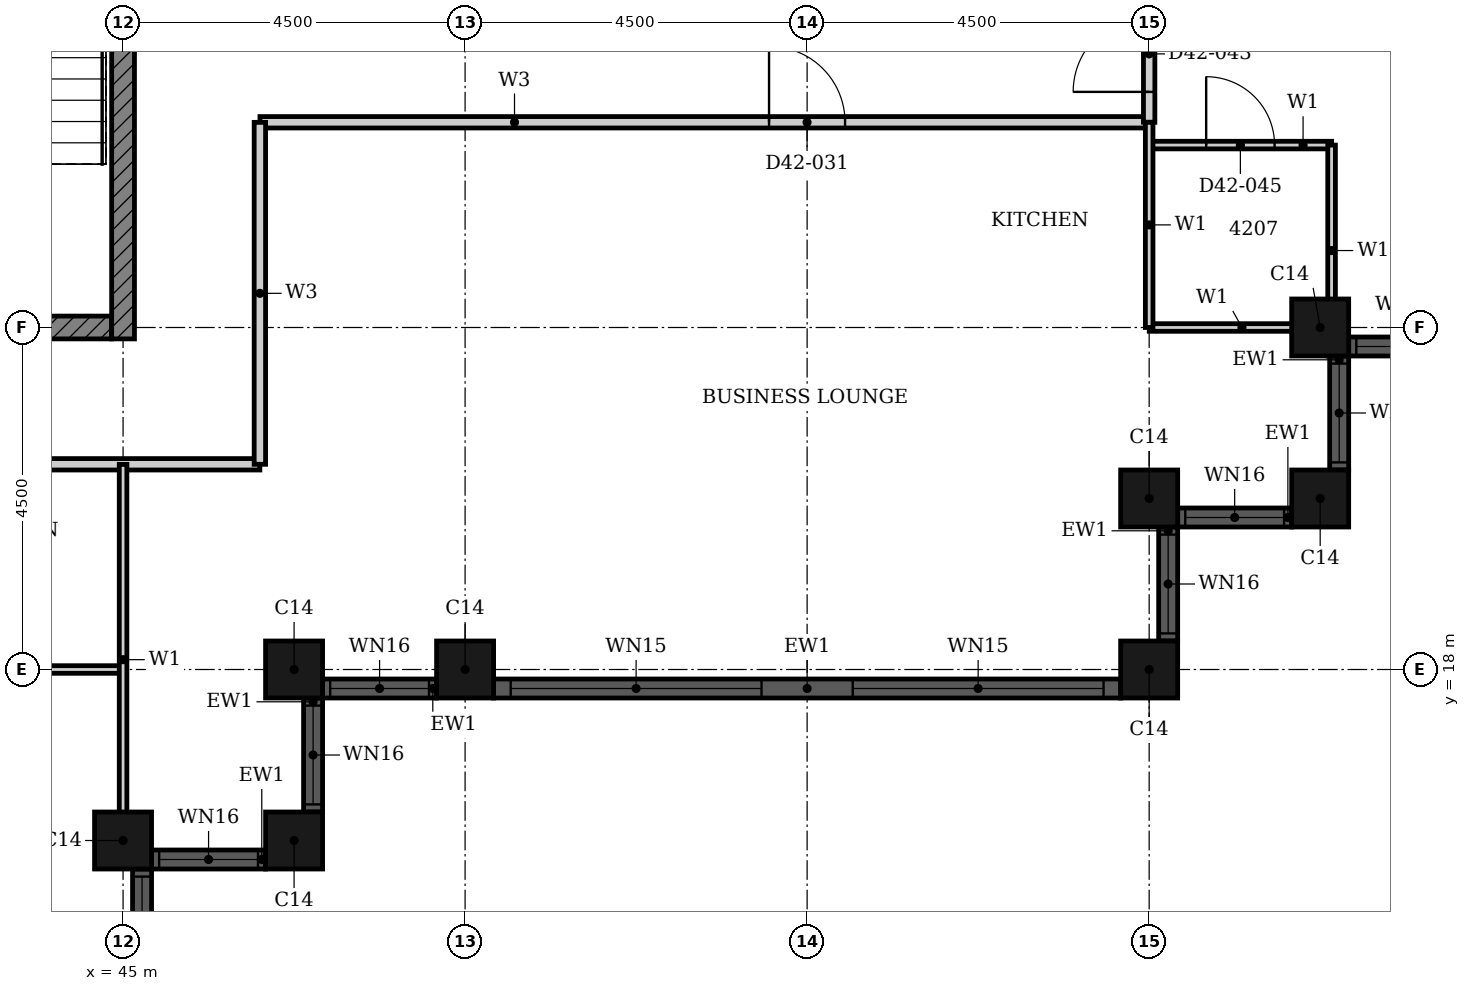
"""IFC4 building model, lengths in metres.
Left out: names, types, materials, properties, quantities, classifications, styles, units other than length and angle.
Written with IfcOpenShell. Run it as: python <this file> out.ifc"""

import sys

from ifc_helpers import new_model, si_unit, direction, frame, frame_2d, origin, origin_2d, place, context, subcontext, project, spatial, rectangle, hollow_rectangle, extrude, element, fill, save


model = new_model("IFC4")
c1 = context("Model", 3, precision=1e-05, world=origin(), true_north=direction((0.0, 1.0)))
c2 = subcontext(c1, "Body", "Model", "MODEL_VIEW")
j1 = project(units=[si_unit("LENGTHUNIT", "METRE"), si_unit("PLANEANGLEUNIT", "RADIAN")], contexts=[c1])
p1 = place(None, origin())
s1 = spatial("IfcSite", under=j1, at=p1, CompositionType="ELEMENT")
p2 = place(p1, origin())
s2 = spatial("IfcBuilding", under=s1, at=p2, CompositionType="ELEMENT")
p3 = place(p2, frame((0.0, 0.0, 169.1)))
s3 = spatial("IfcBuildingStorey", under=s2, at=p3, CompositionType="ELEMENT", Elevation=169.1)
for number, where, z_axis, x_axis in (
    (1, (45.0, 15.75, 0.0), (0.0, 0.0, 1.0), (1.0, 0.0, 0.0)),
    (2, (47.25, 15.75, 0.0), (0.0, 0.0, 1.0), (1.0, 0.0, 0.0)),
    (3, (47.25, 18.0, 0.0), (0.0, 0.0, 1.0), (1.0, 0.0, 0.0)),
    (4, (49.5, 18.0, 0.0), (0.0, 0.0, 1.0), (1.0, 0.0, 0.0)),
    (5, (58.5, 18.0, 0.0), (0.0, 0.0, 1.0), (1.0, 0.0, 0.0)),
    (6, (58.5, 20.25, 0.0), (0.0, 0.0, 1.0), (1.0, 0.0, 0.0)),
    (7, (60.75, 20.25, 0.0), (0.0, 0.0, 1.0), (1.0, 0.0, 0.0)),
    (8, (60.75, 22.5, 0.0), (0.0, 0.0, 1.0), (1.0, 0.0, 0.0)),
):
    element("IfcColumn", number, at=place(p3, frame(where, z_axis=z_axis, x_axis=x_axis)), inside=s3, PredefinedType="COLUMN", context=c2, shape_type="SweptSolid", body=[
        extrude(hollow_rectangle(XDim=0.75, YDim=0.75, WallThickness=0.024, at=origin_2d()), origin(), (0.0, 0.0, 1.0), 3.7),
    ])
p4 = place(p3, frame((45.25, 13.875, 0.0), z_axis=(0.0, 0.0, 1.0), x_axis=(0.0, 1.0, 0.0)))
e9 = element("IfcWall", 9, at=p4, inside=s3, PredefinedType="SOLIDWALL", context=c2, shape_type="SweptSolid", body=[
    extrude(rectangle(XDim=1.5, YDim=0.25, at=frame_2d((0.75, 0.0))), origin(), (0.0, 0.0, 1.0), 3.7),
])
p5 = place(p4, frame((0.1, 0.0, 0.9)))
e10 = element("IfcOpeningElement", 10, at=p5, cuts=e9, PredefinedType="OPENING", context=c2, shape_type="SweptSolid", body=[
    extrude(rectangle(XDim=1.3, YDim=1.85, at=frame_2d((0.65, 0.925))), frame((0.0, 0.135, 0.0), z_axis=(0.0, -1.0, 0.0), x_axis=(1.0, 0.0, 0.0)), (0.0, 0.0, 1.0), 0.27),
])
p6 = place(p3, frame((45.375, 15.5, 0.0), z_axis=(0.0, 0.0, 1.0), x_axis=(1.0, 0.0, 0.0)))
e11 = element("IfcWall", 11, at=p6, inside=s3, PredefinedType="SOLIDWALL", context=c2, shape_type="SweptSolid", body=[
    extrude(rectangle(XDim=1.5, YDim=0.25, at=frame_2d((0.75, 0.0))), origin(), (0.0, 0.0, 1.0), 3.7),
])
p7 = place(p6, frame((0.1, 0.0, 0.9)))
e12 = element("IfcOpeningElement", 12, at=p7, cuts=e11, PredefinedType="OPENING", context=c2, shape_type="SweptSolid", body=[
    extrude(rectangle(XDim=1.3, YDim=1.85, at=frame_2d((0.65, 0.925))), frame((0.0, 0.135, 0.0), z_axis=(0.0, -1.0, 0.0), x_axis=(1.0, 0.0, 0.0)), (0.0, 0.0, 1.0), 0.27),
])
p8 = place(p3, frame((47.5, 16.125, 0.0), z_axis=(0.0, 0.0, 1.0), x_axis=(0.0, 1.0, 0.0)))
e13 = element("IfcWall", 13, at=p8, inside=s3, PredefinedType="SOLIDWALL", context=c2, shape_type="SweptSolid", body=[
    extrude(rectangle(XDim=1.5, YDim=0.25, at=frame_2d((0.75, 0.0))), origin(), (0.0, 0.0, 1.0), 3.7),
])
p9 = place(p8, frame((0.1, 0.0, 0.9)))
e14 = element("IfcOpeningElement", 14, at=p9, cuts=e13, PredefinedType="OPENING", context=c2, shape_type="SweptSolid", body=[
    extrude(rectangle(XDim=1.3, YDim=1.85, at=frame_2d((0.65, 0.925))), frame((0.0, 0.135, 0.0), z_axis=(0.0, -1.0, 0.0), x_axis=(1.0, 0.0, 0.0)), (0.0, 0.0, 1.0), 0.27),
])
p10 = place(p3, frame((47.625, 17.75, 0.0), z_axis=(0.0, 0.0, 1.0), x_axis=(1.0, 0.0, 0.0)))
e15 = element("IfcWall", 15, at=p10, inside=s3, PredefinedType="SOLIDWALL", context=c2, shape_type="SweptSolid", body=[
    extrude(rectangle(XDim=1.5, YDim=0.25, at=frame_2d((0.75, 0.0))), origin(), (0.0, 0.0, 1.0), 3.7),
])
p11 = place(p10, frame((0.1, 0.0, 0.9)))
e16 = element("IfcOpeningElement", 16, at=p11, cuts=e15, PredefinedType="OPENING", context=c2, shape_type="SweptSolid", body=[
    extrude(rectangle(XDim=1.3, YDim=1.85, at=frame_2d((0.65, 0.925))), frame((0.0, 0.135, 0.0), z_axis=(0.0, -1.0, 0.0), x_axis=(1.0, 0.0, 0.0)), (0.0, 0.0, 1.0), 0.27),
])
p12 = place(p3, frame((49.875, 17.75, 0.0), z_axis=(0.0, 0.0, 1.0), x_axis=(1.0, 0.0, 0.0)))
e17 = element("IfcWall", 17, at=p12, inside=s3, PredefinedType="SOLIDWALL", context=c2, shape_type="SweptSolid", body=[
    extrude(rectangle(XDim=8.25, YDim=0.25, at=frame_2d((4.125, 0.0))), origin(), (0.0, 0.0, 1.0), 3.7),
])
p13 = place(p12, frame((0.225, 0.0, 0.45)))
e18 = element("IfcOpeningElement", 18, at=p13, cuts=e17, PredefinedType="OPENING", context=c2, shape_type="SweptSolid", body=[
    extrude(rectangle(XDim=3.3, YDim=2.3, at=frame_2d((1.65, 1.15))), frame((0.0, 0.135, 0.0), z_axis=(0.0, -1.0, 0.0), x_axis=(1.0, 0.0, 0.0)), (0.0, 0.0, 1.0), 0.27),
])
p14 = place(p12, frame((4.725, 0.0, 0.45)))
e19 = element("IfcOpeningElement", 19, at=p14, cuts=e17, PredefinedType="OPENING", context=c2, shape_type="SweptSolid", body=[
    extrude(rectangle(XDim=3.3, YDim=2.3, at=frame_2d((1.65, 1.15))), frame((0.0, 0.135, 0.0), z_axis=(0.0, -1.0, 0.0), x_axis=(1.0, 0.0, 0.0)), (0.0, 0.0, 1.0), 0.27),
])
p15 = place(p3, frame((58.75, 18.375, 0.0), z_axis=(0.0, 0.0, 1.0), x_axis=(0.0, 1.0, 0.0)))
e20 = element("IfcWall", 20, at=p15, inside=s3, PredefinedType="SOLIDWALL", context=c2, shape_type="SweptSolid", body=[
    extrude(rectangle(XDim=1.5, YDim=0.25, at=frame_2d((0.75, 0.0))), origin(), (0.0, 0.0, 1.0), 3.7),
])
p16 = place(p15, frame((0.1, 0.0, 0.9)))
e21 = element("IfcOpeningElement", 21, at=p16, cuts=e20, PredefinedType="OPENING", context=c2, shape_type="SweptSolid", body=[
    extrude(rectangle(XDim=1.3, YDim=1.85, at=frame_2d((0.65, 0.925))), frame((0.0, 0.135, 0.0), z_axis=(0.0, -1.0, 0.0), x_axis=(1.0, 0.0, 0.0)), (0.0, 0.0, 1.0), 0.27),
])
p17 = place(p3, frame((58.875, 20.0, 0.0), z_axis=(0.0, 0.0, 1.0), x_axis=(1.0, 0.0, 0.0)))
e22 = element("IfcWall", 22, at=p17, inside=s3, PredefinedType="SOLIDWALL", context=c2, shape_type="SweptSolid", body=[
    extrude(rectangle(XDim=1.5, YDim=0.25, at=frame_2d((0.75, 0.0))), origin(), (0.0, 0.0, 1.0), 3.7),
])
p18 = place(p17, frame((0.1, 0.0, 0.9)))
e23 = element("IfcOpeningElement", 23, at=p18, cuts=e22, PredefinedType="OPENING", context=c2, shape_type="SweptSolid", body=[
    extrude(rectangle(XDim=1.3, YDim=1.85, at=frame_2d((0.65, 0.925))), frame((0.0, 0.135, 0.0), z_axis=(0.0, -1.0, 0.0), x_axis=(1.0, 0.0, 0.0)), (0.0, 0.0, 1.0), 0.27),
])
p19 = place(p3, frame((61.0, 20.625, 0.0), z_axis=(0.0, 0.0, 1.0), x_axis=(0.0, 1.0, 0.0)))
e24 = element("IfcWall", 24, at=p19, inside=s3, PredefinedType="SOLIDWALL", context=c2, shape_type="SweptSolid", body=[
    extrude(rectangle(XDim=1.5, YDim=0.25, at=frame_2d((0.75, 0.0))), origin(), (0.0, 0.0, 1.0), 3.7),
])
p20 = place(p19, frame((0.1, 0.0, 0.9)))
e25 = element("IfcOpeningElement", 25, at=p20, cuts=e24, PredefinedType="OPENING", context=c2, shape_type="SweptSolid", body=[
    extrude(rectangle(XDim=1.3, YDim=1.85, at=frame_2d((0.65, 0.925))), frame((0.0, 0.135, 0.0), z_axis=(0.0, -1.0, 0.0), x_axis=(1.0, 0.0, 0.0)), (0.0, 0.0, 1.0), 0.27),
])
p21 = place(p3, frame((61.125, 22.25, 0.0), z_axis=(0.0, 0.0, 1.0), x_axis=(1.0, 0.0, 0.0)))
e26 = element("IfcWall", 26, at=p21, inside=s3, PredefinedType="SOLIDWALL", context=c2, shape_type="SweptSolid", body=[
    extrude(rectangle(XDim=1.5, YDim=0.25, at=frame_2d((0.75, 0.0))), origin(), (0.0, 0.0, 1.0), 3.7),
])
p22 = place(p21, frame((0.1, 0.0, 0.9)))
e27 = element("IfcOpeningElement", 27, at=p22, cuts=e26, PredefinedType="OPENING", context=c2, shape_type="SweptSolid", body=[
    extrude(rectangle(XDim=1.3, YDim=1.85, at=frame_2d((0.65, 0.925))), frame((0.0, 0.135, 0.0), z_axis=(0.0, -1.0, 0.0), x_axis=(1.0, 0.0, 0.0)), (0.0, 0.0, 1.0), 0.27),
])
p23 = place(p3, frame((32.911, 22.5, 0.0), z_axis=(0.0, 0.0, 1.0), x_axis=(1.0, 0.0, 0.0)))
e28 = element("IfcWall", 28, at=p23, inside=s3, PredefinedType="SHEAR", context=c2, shape_type="SweptSolid", body=[
    extrude(rectangle(XDim=11.939, YDim=0.3, at=frame_2d((5.97, 0.0))), origin(), (0.0, 0.0, 1.0), 3.4),
])
p24 = place(p23, frame((5.404, 0.0, 0.0)))
e29 = element("IfcOpeningElement", 29, at=p24, cuts=e28, PredefinedType="OPENING", context=c2, shape_type="SweptSolid", body=[
    extrude(rectangle(XDim=1.8, YDim=2.1, at=frame_2d((0.9, 1.05))), frame((0.0, 0.16, 0.0), z_axis=(0.0, -1.0, 0.0), x_axis=(1.0, 0.0, 0.0)), (0.0, 0.0, 1.0), 0.32),
])
p25 = place(p3, frame((45.0, 22.35, 0.0), z_axis=(0.0, 0.0, 1.0), x_axis=(0.0, 1.0, 0.0)))
e30 = element("IfcWall", 30, at=p25, inside=s3, PredefinedType="SHEAR", context=c2, shape_type="SweptSolid", body=[
    extrude(rectangle(XDim=9.3, YDim=0.3, at=frame_2d((4.65, 0.0))), origin(), (0.0, 0.0, 1.0), 3.4),
])
p26 = place(p3, frame((38.4, 20.7, 0.0), z_axis=(0.0, 0.0, 1.0), x_axis=(1.0, 0.0, 0.0)))
e31 = element("IfcWall", 31, at=p26, inside=s3, PredefinedType="PARTITIONING", context=c2, shape_type="SweptSolid", body=[
    extrude(rectangle(XDim=8.4, YDim=0.15, at=frame_2d((4.2, 0.0))), origin(), (0.0, 0.0, 1.0), 3.4),
])
p27 = place(p3, frame((46.801, 25.2, 0.0), z_axis=(0.0, 0.0, 1.0), x_axis=(1.0, 0.0, 0.0)))
e32 = element("IfcWall", 32, at=p27, inside=s3, PredefinedType="PARTITIONING", context=c2, shape_type="SweptSolid", body=[
    extrude(rectangle(XDim=11.699, YDim=0.15, at=frame_2d((5.85, 0.0))), origin(), (0.0, 0.0, 1.0), 3.4),
])
p28 = place(p27, frame((6.698, 0.0, 0.0)))
e33 = element("IfcOpeningElement", 33, at=p28, cuts=e32, PredefinedType="OPENING", context=c2, shape_type="SweptSolid", body=[
    extrude(rectangle(XDim=1.0, YDim=2.1, at=frame_2d((0.5, 1.05))), frame((0.0, 0.085, 0.0), z_axis=(0.0, -1.0, 0.0), x_axis=(1.0, 0.0, 0.0)), (0.0, 0.0, 1.0), 0.17),
])
p29 = place(p3, frame((46.8, 20.7, 0.0), z_axis=(0.0, 0.0, 1.0), x_axis=(0.0, 1.0, 0.0)))
e34 = element("IfcWall", 34, at=p29, inside=s3, PredefinedType="PARTITIONING", context=c2, shape_type="SweptSolid", body=[
    extrude(rectangle(XDim=4.499, YDim=0.15, at=frame_2d((2.25, 0.0))), origin(), (0.0, 0.0, 1.0), 3.4),
])
p30 = place(p3, frame((58.5, 25.2, 0.0), z_axis=(0.0, 0.0, 1.0), x_axis=(0.0, 1.0, 0.0)))
e35 = element("IfcWall", 35, at=p30, inside=s3, PredefinedType="PARTITIONING", context=c2, shape_type="SweptSolid", body=[
    extrude(rectangle(XDim=1.8, YDim=0.15, at=frame_2d((0.9, 0.0))), origin(), (0.0, 0.0, 1.0), 3.4),
])
p31 = place(p30, frame((0.4, 0.0, 0.0)))
e36 = element("IfcOpeningElement", 36, at=p31, cuts=e35, PredefinedType="OPENING", context=c2, shape_type="SweptSolid", body=[
    extrude(rectangle(XDim=1.0, YDim=2.2, at=frame_2d((0.5, 1.1))), frame((0.0, 0.085, 0.0), z_axis=(0.0, -1.0, 0.0), x_axis=(1.0, 0.0, 0.0)), (0.0, 0.0, 1.0), 0.17),
])
p32 = place(p3, frame((42.0, 18.0, 0.0), z_axis=(0.0, 0.0, 1.0), x_axis=(1.0, 0.0, 0.0)))
e37 = element("IfcWall", 37, at=p32, inside=s3, PredefinedType="PARTITIONING", context=c2, shape_type="SweptSolid", body=[
    extrude(rectangle(XDim=3.0, YDim=0.1, at=frame_2d((1.5, 0.0))), origin(), (0.0, 0.0, 1.0), 3.4),
])
p33 = place(p32, frame((1.05, 0.0, 0.0)))
e38 = element("IfcOpeningElement", 38, at=p33, cuts=e37, PredefinedType="OPENING", context=c2, shape_type="SweptSolid", body=[
    extrude(rectangle(XDim=0.9, YDim=2.1, at=frame_2d((0.45, 1.05))), frame((0.0, 0.06, 0.0), z_axis=(0.0, -1.0, 0.0), x_axis=(1.0, 0.0, 0.0)), (0.0, 0.0, 1.0), 0.12),
])
p34 = place(p3, frame((58.501, 22.5, 0.0), z_axis=(0.0, 0.0, 1.0), x_axis=(1.0, 0.0, 0.0)))
e39 = element("IfcWall", 39, at=p34, inside=s3, PredefinedType="PARTITIONING", context=c2, shape_type="SweptSolid", body=[
    extrude(rectangle(XDim=2.439, YDim=0.1, at=frame_2d((1.219, 0.0))), origin(), (0.0, 0.0, 1.0), 2.68),
])
p35 = place(p3, frame((58.5, 24.9, 0.0), z_axis=(0.0, 0.0, 1.0), x_axis=(1.0, 0.0, 0.0)))
e40 = element("IfcWall", 40, at=p35, inside=s3, PredefinedType="PARTITIONING", context=c2, shape_type="SweptSolid", body=[
    extrude(rectangle(XDim=2.4, YDim=0.1, at=frame_2d((1.2, 0.0))), origin(), (0.0, 0.0, 1.0), 3.4),
])
p36 = place(p35, frame((0.75, 0.0, 0.0)))
e41 = element("IfcOpeningElement", 41, at=p36, cuts=e40, PredefinedType="OPENING", context=c2, shape_type="SweptSolid", body=[
    extrude(rectangle(XDim=0.9, YDim=2.1, at=frame_2d((0.45, 1.05))), frame((0.0, 0.06, 0.0), z_axis=(0.0, -1.0, 0.0), x_axis=(1.0, 0.0, 0.0)), (0.0, 0.0, 1.0), 0.12),
])
p37 = place(p3, frame((45.0, 15.56, 0.0), z_axis=(0.0, 0.0, 1.0), x_axis=(0.0, 1.0, 0.0)))
e42 = element("IfcWall", 42, at=p37, inside=s3, PredefinedType="PARTITIONING", context=c2, shape_type="SweptSolid", body=[
    extrude(rectangle(XDim=5.139, YDim=0.1, at=frame_2d((2.569, 0.0))), origin(), (0.0, 0.0, 1.0), 3.4),
])
p38 = place(p3, frame((58.5, 22.5, 0.0), z_axis=(0.0, 0.0, 1.0), x_axis=(0.0, 1.0, 0.0)))
e43 = element("IfcWall", 43, at=p38, inside=s3, PredefinedType="PARTITIONING", context=c2, shape_type="SweptSolid", body=[
    extrude(rectangle(XDim=2.7, YDim=0.1, at=frame_2d((1.35, 0.0))), origin(), (0.0, 0.0, 1.0), 3.4),
])
p39 = place(p3, frame((60.9, 22.125, 0.0), z_axis=(0.0, 0.0, 1.0), x_axis=(0.0, 1.0, 0.0)))
e44 = element("IfcWall", 44, at=p39, inside=s3, PredefinedType="PARTITIONING", context=c2, shape_type="SweptSolid", body=[
    extrude(rectangle(XDim=2.775, YDim=0.1, at=frame_2d((1.387, 0.0))), origin(), (0.0, 0.0, 1.0), 3.4),
])
p40 = place(p5, origin())
e45 = element("IfcWindow", 45, at=p40, inside=s3, PartitioningType="SINGLE_PANEL", PredefinedType="WINDOW", context=c2, shape_type="SweptSolid", body=[
    extrude(rectangle(XDim=1.3, YDim=1.85, at=frame_2d((0.65, 0.925))), frame((0.0, 0.03, 0.0), z_axis=(0.0, -1.0, 0.0), x_axis=(1.0, 0.0, 0.0)), (0.0, 0.0, 1.0), 0.06),
])
fill(e10, e45)
p41 = place(p7, origin())
e46 = element("IfcWindow", 46, at=p41, inside=s3, PartitioningType="SINGLE_PANEL", PredefinedType="WINDOW", context=c2, shape_type="SweptSolid", body=[
    extrude(rectangle(XDim=1.3, YDim=1.85, at=frame_2d((0.65, 0.925))), frame((0.0, 0.03, 0.0), z_axis=(0.0, -1.0, 0.0), x_axis=(1.0, 0.0, 0.0)), (0.0, 0.0, 1.0), 0.06),
])
fill(e12, e46)
p42 = place(p9, origin())
e47 = element("IfcWindow", 47, at=p42, inside=s3, PartitioningType="SINGLE_PANEL", PredefinedType="WINDOW", context=c2, shape_type="SweptSolid", body=[
    extrude(rectangle(XDim=1.3, YDim=1.85, at=frame_2d((0.65, 0.925))), frame((0.0, 0.03, 0.0), z_axis=(0.0, -1.0, 0.0), x_axis=(1.0, 0.0, 0.0)), (0.0, 0.0, 1.0), 0.06),
])
fill(e14, e47)
p43 = place(p11, origin())
e48 = element("IfcWindow", 48, at=p43, inside=s3, PartitioningType="SINGLE_PANEL", PredefinedType="WINDOW", context=c2, shape_type="SweptSolid", body=[
    extrude(rectangle(XDim=1.3, YDim=1.85, at=frame_2d((0.65, 0.925))), frame((0.0, 0.03, 0.0), z_axis=(0.0, -1.0, 0.0), x_axis=(1.0, 0.0, 0.0)), (0.0, 0.0, 1.0), 0.06),
])
fill(e16, e48)
p44 = place(p13, origin())
e49 = element("IfcWindow", 49, at=p44, inside=s3, PartitioningType="SINGLE_PANEL", PredefinedType="WINDOW", context=c2, shape_type="SweptSolid", body=[
    extrude(rectangle(XDim=3.3, YDim=2.3, at=frame_2d((1.65, 1.15))), frame((0.0, 0.03, 0.0), z_axis=(0.0, -1.0, 0.0), x_axis=(1.0, 0.0, 0.0)), (0.0, 0.0, 1.0), 0.06),
])
fill(e18, e49)
p45 = place(p14, origin())
e50 = element("IfcWindow", 50, at=p45, inside=s3, PartitioningType="SINGLE_PANEL", PredefinedType="WINDOW", context=c2, shape_type="SweptSolid", body=[
    extrude(rectangle(XDim=3.3, YDim=2.3, at=frame_2d((1.65, 1.15))), frame((0.0, 0.03, 0.0), z_axis=(0.0, -1.0, 0.0), x_axis=(1.0, 0.0, 0.0)), (0.0, 0.0, 1.0), 0.06),
])
fill(e19, e50)
p46 = place(p16, origin())
e51 = element("IfcWindow", 51, at=p46, inside=s3, PartitioningType="SINGLE_PANEL", PredefinedType="WINDOW", context=c2, shape_type="SweptSolid", body=[
    extrude(rectangle(XDim=1.3, YDim=1.85, at=frame_2d((0.65, 0.925))), frame((0.0, 0.03, 0.0), z_axis=(0.0, -1.0, 0.0), x_axis=(1.0, 0.0, 0.0)), (0.0, 0.0, 1.0), 0.06),
])
fill(e21, e51)
p47 = place(p18, origin())
e52 = element("IfcWindow", 52, at=p47, inside=s3, PartitioningType="SINGLE_PANEL", PredefinedType="WINDOW", context=c2, shape_type="SweptSolid", body=[
    extrude(rectangle(XDim=1.3, YDim=1.85, at=frame_2d((0.65, 0.925))), frame((0.0, 0.03, 0.0), z_axis=(0.0, -1.0, 0.0), x_axis=(1.0, 0.0, 0.0)), (0.0, 0.0, 1.0), 0.06),
])
fill(e23, e52)
p48 = place(p20, origin())
e53 = element("IfcWindow", 53, at=p48, inside=s3, PartitioningType="SINGLE_PANEL", PredefinedType="WINDOW", context=c2, shape_type="SweptSolid", body=[
    extrude(rectangle(XDim=1.3, YDim=1.85, at=frame_2d((0.65, 0.925))), frame((0.0, 0.03, 0.0), z_axis=(0.0, -1.0, 0.0), x_axis=(1.0, 0.0, 0.0)), (0.0, 0.0, 1.0), 0.06),
])
fill(e25, e53)
p49 = place(p22, origin())
e54 = element("IfcWindow", 54, at=p49, inside=s3, PartitioningType="SINGLE_PANEL", PredefinedType="WINDOW", context=c2, shape_type="SweptSolid", body=[
    extrude(rectangle(XDim=1.3, YDim=1.85, at=frame_2d((0.65, 0.925))), frame((0.0, 0.03, 0.0), z_axis=(0.0, -1.0, 0.0), x_axis=(1.0, 0.0, 0.0)), (0.0, 0.0, 1.0), 0.06),
])
fill(e27, e54)
p50 = place(p28, origin())
e55 = element("IfcDoor", 55, at=p50, inside=s3, OperationType="SINGLE_SWING_RIGHT", PredefinedType="DOOR", context=c2, shape_type="SweptSolid", body=[
    extrude(rectangle(XDim=1.0, YDim=2.1, at=frame_2d((0.5, 1.05))), frame((0.0, 0.025, 0.0), z_axis=(0.0, -1.0, 0.0), x_axis=(1.0, 0.0, 0.0)), (0.0, 0.0, 1.0), 0.05),
])
fill(e33, e55)
p51 = place(p31, origin())
e56 = element("IfcDoor", 56, at=p51, inside=s3, OperationType="SINGLE_SWING_RIGHT", PredefinedType="DOOR", context=c2, shape_type="SweptSolid", body=[
    extrude(rectangle(XDim=1.0, YDim=2.2, at=frame_2d((0.5, 1.1))), frame((0.0, 0.025, 0.0), z_axis=(0.0, -1.0, 0.0), x_axis=(1.0, 0.0, 0.0)), (0.0, 0.0, 1.0), 0.05),
])
fill(e36, e56)
p52 = place(p36, origin())
e57 = element("IfcDoor", 57, at=p52, inside=s3, OperationType="SINGLE_SWING_LEFT", PredefinedType="DOOR", context=c2, shape_type="SweptSolid", body=[
    extrude(rectangle(XDim=0.9, YDim=2.1, at=frame_2d((0.45, 1.05))), frame((0.0, 0.025, 0.0), z_axis=(0.0, -1.0, 0.0), x_axis=(1.0, 0.0, 0.0)), (0.0, 0.0, 1.0), 0.05),
])
fill(e41, e57)
save(model, sys.argv[1])
